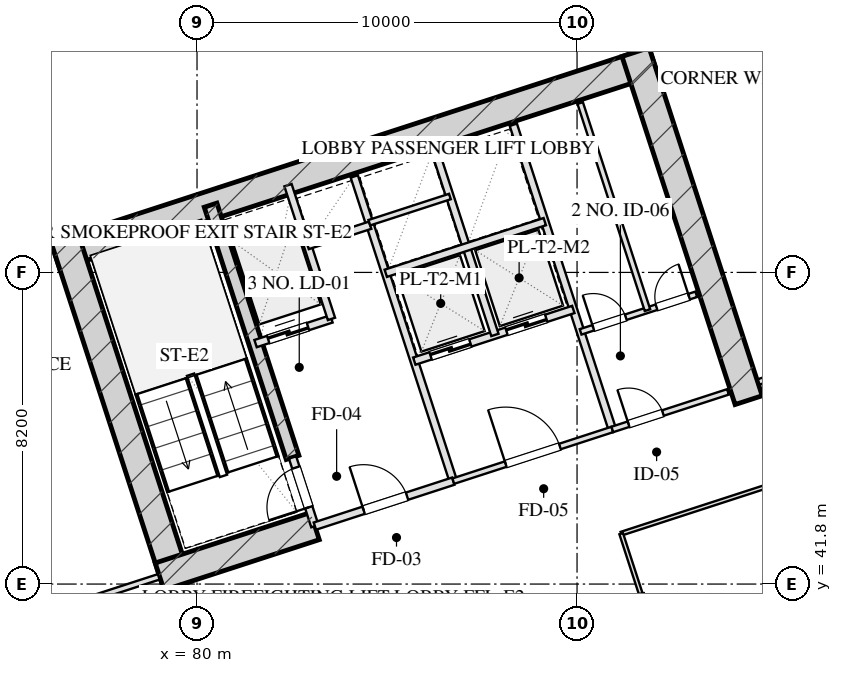
"""IFC4 building model, lengths in metres.
Left out: names, types, materials, properties, quantities, classifications, styles, units other than length and angle.
Written with IfcOpenShell. Run it as: python <this file> out.ifc"""

import sys

from ifc_helpers import new_model, si_unit, direction, frame, frame_2d, origin, place, context, subcontext, project, spatial, rectangle, extrude, element, fill, save


model = new_model("IFC4")
c1 = context("Model", 3, precision=1e-05, world=origin(), true_north=direction((0.0, 1.0)))
c2 = subcontext(c1, "Body", "Model", "MODEL_VIEW")
j1 = project(units=[si_unit("LENGTHUNIT", "METRE"), si_unit("PLANEANGLEUNIT", "RADIAN")], contexts=[c1])
p1 = place(None, origin())
s1 = spatial("IfcSite", under=j1, at=p1, CompositionType="ELEMENT")
p2 = place(p1, origin())
s2 = spatial("IfcBuilding", under=s1, at=p2, CompositionType="ELEMENT")
p3 = place(p2, frame((0.0, 0.0, 50.6)))
s3 = spatial("IfcBuildingStorey", under=s2, at=p3, CompositionType="ELEMENT", Elevation=50.6)
p4 = place(p3, frame((76.272, 50.443, 0.0), z_axis=(0.0, 0.0, 1.0), x_axis=(0.951056072937, 0.309018358888, 0.0)))
e1 = element("IfcWall", 1, at=p4, inside=s3, PredefinedType="SHEAR", context=c2, shape_type="SweptSolid", body=[
    extrude(rectangle(XDim=16.55, YDim=0.75, at=frame_2d((8.275, 0.0))), origin(), (0.0, 0.0, 1.0), 3.45),
])
for number, where, z_axis, x_axis in (
    (2, (79.489, 41.756, 0.0), (0.0, 0.0, 1.0), (-0.309, 0.951, 0.0)),
    (3, (94.515, 46.639, 0.0), (0.0, 0.0, 1.0), (-0.309, 0.951, 0.0)),
):
    element("IfcWall", number, at=place(p3, frame(where, z_axis=z_axis, x_axis=x_axis)), inside=s3, PredefinedType="SHEAR", context=c2, shape_type="SweptSolid", body=[
        extrude(rectangle(XDim=9.63, YDim=0.75, at=frame_2d((4.815, 0.0))), origin(), (0.0, 0.0, 1.0), 3.45),
    ])
p5 = place(p3, frame((82.514, 45.131, 0.0), z_axis=(0.0, 0.0, 1.0), x_axis=(-0.308988790936, 0.951065679686, 0.0)))
e4 = element("IfcWall", 4, at=p5, inside=s3, PredefinedType="SHEAR", context=c2, shape_type="SweptSolid", body=[
    extrude(rectangle(XDim=6.98, YDim=0.35, at=frame_2d((3.49, 0.0))), origin(), (0.0, 0.0, 1.0), 3.45),
])
p6 = place(p3, frame((79.016, 41.997, 0.0), z_axis=(0.0, 0.0, 1.0), x_axis=(0.95106038264, 0.309005094736, 0.0)))
e5 = element("IfcWall", 5, at=p6, inside=s3, PredefinedType="SHEAR", context=c2, shape_type="SweptSolid", body=[
    extrude(rectangle(XDim=4.295, YDim=0.75, at=frame_2d((2.147, 0.0))), origin(), (0.0, 0.0, 1.0), 3.45),
])
p7 = place(p3, frame((79.655, 4.352, 0.0), z_axis=(0.0, 0.0, 1.0), x_axis=(-0.309014526607, 0.951057318118, 0.0)))
e6 = element("IfcWall", 6, at=p7, inside=s3, PredefinedType="SOLIDWALL", context=c2, shape_type="SweptSolid", body=[
    extrude(rectangle(XDim=50.0, YDim=0.4, at=frame_2d((25.0, 0.0))), origin(), (0.0, 0.0, 1.0), 2.61),
])
p8 = place(p7, frame((27.05, 0.0, 0.0)))
e7 = element("IfcOpeningElement", 7, at=p8, cuts=e6, PredefinedType="OPENING", context=c2, shape_type="SweptSolid", body=[
    extrude(rectangle(XDim=1.1, YDim=2.15, at=frame_2d((0.55, 1.075))), frame((0.0, 0.21, 0.0), z_axis=(0.0, -1.0, 0.0), x_axis=(1.0, 0.0, 0.0)), (0.0, 0.0, 1.0), 0.42),
])
p9 = place(p3, frame((66.002, 55.433, 0.0), z_axis=(0.0, 0.0, 1.0), x_axis=(0.951055939317, 0.309018770125, 0.0)))
e8 = element("IfcWall", 8, at=p9, inside=s3, PredefinedType="SOLIDWALL", context=c2, shape_type="SweptSolid", body=[
    extrude(rectangle(XDim=32.4, YDim=0.4, at=frame_2d((16.2, 0.0))), origin(), (0.0, 0.0, 1.0), 2.61),
])
p10 = place(p3, frame((83.101, 43.324, 0.0), z_axis=(0.0, 0.0, 1.0), x_axis=(-0.309048298632, 0.951046344356, 0.0)))
e9 = element("IfcWall", 9, at=p10, inside=s3, PredefinedType="PARTITIONING", context=c2, shape_type="SweptSolid", body=[
    extrude(rectangle(XDim=1.9, YDim=0.2, at=frame_2d((0.95, 0.0))), origin(), (0.0, 0.0, 1.0), 3.175),
])
p11 = place(p10, frame((0.52, 0.0, 0.0)))
e10 = element("IfcOpeningElement", 10, at=p11, cuts=e9, PredefinedType="OPENING", context=c2, shape_type="SweptSolid", body=[
    extrude(rectangle(XDim=1.1, YDim=2.05, at=frame_2d((0.55, 1.025))), frame((0.0, 0.11, 0.0), z_axis=(0.0, -1.0, 0.0), x_axis=(1.0, 0.0, 0.0)), (0.0, 0.0, 1.0), 0.22),
])
p12 = place(p3, frame((86.743, 44.508, 0.0), z_axis=(0.0, 0.0, 1.0), x_axis=(-0.309016001439, 0.951056838919, 0.0)))
e11 = element("IfcWall", 11, at=p12, inside=s3, PredefinedType="PARTITIONING", context=c2, shape_type="SweptSolid", body=[
    extrude(rectangle(XDim=8.43, YDim=0.2, at=frame_2d((4.215, 0.0))), origin(), (0.0, 0.0, 1.0), 3.175),
])
p13 = place(p3, frame((83.101, 43.324, 0.0), z_axis=(0.0, 0.0, 1.0), x_axis=(0.951052804469, 0.309028417967, 0.0)))
e12 = element("IfcWall", 12, at=p13, inside=s3, PredefinedType="PARTITIONING", context=c2, shape_type="SweptSolid", body=[
    extrude(rectangle(XDim=3.83, YDim=0.2, at=frame_2d((1.915, 0.0))), origin(), (0.0, 0.0, 1.0), 3.175),
])
p14 = place(p13, frame((1.35, 0.0, 0.0)))
e13 = element("IfcOpeningElement", 13, at=p14, cuts=e12, PredefinedType="OPENING", context=c2, shape_type="SweptSolid", body=[
    extrude(rectangle(XDim=1.2, YDim=2.05, at=frame_2d((0.6, 1.025))), frame((0.0, 0.11, 0.0), z_axis=(0.0, -1.0, 0.0), x_axis=(1.0, 0.0, 0.0)), (0.0, 0.0, 1.0), 0.22),
])
p15 = place(p3, frame((81.54, 48.127, 0.0), z_axis=(0.0, 0.0, 1.0), x_axis=(0.951062257173, 0.308999325213, 0.0)))
e14 = element("IfcWall", 14, at=p15, inside=s3, PredefinedType="PARTITIONING", context=c2, shape_type="SweptSolid", body=[
    extrude(rectangle(XDim=2.1, YDim=0.2, at=frame_2d((1.05, 0.0))), origin(), (0.0, 0.0, 1.0), 3.175),
])
p16 = place(p15, frame((0.35, 0.0, 0.0)))
e15 = element("IfcOpeningElement", 15, at=p16, cuts=e14, PredefinedType="OPENING", context=c2, shape_type="SweptSolid", body=[
    extrude(rectangle(XDim=1.1, YDim=2.05, at=frame_2d((0.55, 1.025))), frame((0.0, 0.11, 0.0), z_axis=(0.0, -1.0, 0.0), x_axis=(1.0, 0.0, 0.0)), (0.0, 0.0, 1.0), 0.22),
])
p17 = place(p3, frame((83.538, 48.776, 0.0), z_axis=(0.0, 0.0, 1.0), x_axis=(-0.3089935693, 0.951064127245, 0.0)))
e16 = element("IfcWall", 16, at=p17, inside=s3, PredefinedType="PARTITIONING", context=c2, shape_type="SweptSolid", body=[
    extrude(rectangle(XDim=3.7, YDim=0.2, at=frame_2d((1.85, 0.0))), origin(), (0.0, 0.0, 1.0), 3.175),
])
p18 = place(p3, frame((82.91, 50.707, 0.0), z_axis=(0.0, 0.0, 1.0), x_axis=(0.951041328149, 0.309063734775, 0.0)))
e17 = element("IfcWall", 17, at=p18, inside=s3, PredefinedType="PARTITIONING", context=c2, shape_type="SweptSolid", body=[
    extrude(rectangle(XDim=1.73, YDim=0.2, at=frame_2d((0.865, 0.0))), origin(), (0.0, 0.0, 1.0), 3.175),
])
p19 = place(p3, frame((90.928, 45.868, 0.0), z_axis=(0.0, 0.0, 1.0), x_axis=(-0.309042196757, 0.951048327176, 0.0)))
e18 = element("IfcWall", 18, at=p19, inside=s3, PredefinedType="PARTITIONING", context=c2, shape_type="SweptSolid", body=[
    extrude(rectangle(XDim=8.43, YDim=0.2, at=frame_2d((4.215, 0.0))), origin(), (0.0, 0.0, 1.0), 3.175),
])
p20 = place(p3, frame((86.743, 44.508, 0.0), z_axis=(0.0, 0.0, 1.0), x_axis=(0.951063829732, 0.308994485023, 0.0)))
e19 = element("IfcWall", 19, at=p20, inside=s3, PredefinedType="PARTITIONING", context=c2, shape_type="SweptSolid", body=[
    extrude(rectangle(XDim=4.4, YDim=0.15, at=frame_2d((2.2, 0.0))), origin(), (0.0, 0.0, 1.0), 3.175),
])
p21 = place(p20, frame((1.45, 0.0, 0.0)))
e20 = element("IfcOpeningElement", 20, at=p21, cuts=e19, PredefinedType="OPENING", context=c2, shape_type="SweptSolid", body=[
    extrude(rectangle(XDim=1.5, YDim=2.05, at=frame_2d((0.75, 1.025))), frame((0.0, 0.085, 0.0), z_axis=(0.0, -1.0, 0.0), x_axis=(1.0, 0.0, 0.0)), (0.0, 0.0, 1.0), 0.17),
])
p22 = place(p3, frame((85.718, 47.666, 0.0), z_axis=(0.0, 0.0, 1.0), x_axis=(0.951058531764, 0.30901079133, 0.0)))
e21 = element("IfcWall", 21, at=p22, inside=s3, PredefinedType="PARTITIONING", context=c2, shape_type="SweptSolid", body=[
    extrude(rectangle(XDim=4.4, YDim=0.2, at=frame_2d((2.2, 0.0))), origin(), (0.0, 0.0, 1.0), 3.175),
])
p23 = place(p22, frame((0.45, 0.0, 0.0)))
e22 = element("IfcOpeningElement", 22, at=p23, cuts=e21, PredefinedType="OPENING", context=c2, shape_type="SweptSolid", body=[
    extrude(rectangle(XDim=1.1, YDim=2.05, at=frame_2d((0.55, 1.025))), frame((0.0, 0.11, 0.0), z_axis=(0.0, -1.0, 0.0), x_axis=(1.0, 0.0, 0.0)), (0.0, 0.0, 1.0), 0.22),
])
p24 = place(p22, frame((2.55, 0.0, 0.0)))
e23 = element("IfcOpeningElement", 23, at=p24, cuts=e21, PredefinedType="OPENING", context=c2, shape_type="SweptSolid", body=[
    extrude(rectangle(XDim=1.1, YDim=2.05, at=frame_2d((0.55, 1.025))), frame((0.0, 0.11, 0.0), z_axis=(0.0, -1.0, 0.0), x_axis=(1.0, 0.0, 0.0)), (0.0, 0.0, 1.0), 0.22),
])
p25 = place(p3, frame((87.838, 48.354, 0.0), z_axis=(0.0, 0.0, 1.0), x_axis=(-0.3090093719, 0.951058992953, 0.0)))
e24 = element("IfcWall", 24, at=p25, inside=s3, PredefinedType="PARTITIONING", context=c2, shape_type="SweptSolid", body=[
    extrude(rectangle(XDim=5.11, YDim=0.2, at=frame_2d((2.555, 0.0))), origin(), (0.0, 0.0, 1.0), 3.175),
])
p26 = place(p3, frame((84.967, 49.977, 0.0), z_axis=(0.0, 0.0, 1.0), x_axis=(0.951063829732, 0.308994485023, 0.0)))
e25 = element("IfcWall", 25, at=p26, inside=s3, PredefinedType="PARTITIONING", context=c2, shape_type="SweptSolid", body=[
    extrude(rectangle(XDim=4.4, YDim=0.2, at=frame_2d((2.2, 0.0))), origin(), (0.0, 0.0, 1.0), 3.175),
])
p27 = place(p3, frame((84.534, 51.308, 0.0), z_axis=(0.0, 0.0, 1.0), x_axis=(0.951075093106, 0.308959814982, 0.0)))
e26 = element("IfcWall", 26, at=p27, inside=s3, PredefinedType="PARTITIONING", context=c2, shape_type="SweptSolid", body=[
    extrude(rectangle(XDim=2.23, YDim=0.15, at=frame_2d((1.115, 0.0))), origin(), (0.0, 0.0, 1.0), 3.175),
])
p28 = place(p3, frame((90.928, 45.868, 0.0), z_axis=(0.0, 0.0, 1.0), x_axis=(0.951059297078, 0.309008435874, 0.0)))
e27 = element("IfcWall", 27, at=p28, inside=s3, PredefinedType="PARTITIONING", context=c2, shape_type="SweptSolid", body=[
    extrude(rectangle(XDim=3.2, YDim=0.15, at=frame_2d((1.6, 0.0))), origin(), (0.0, 0.0, 1.0), 3.175),
])
p29 = place(p28, frame((0.45, 0.0, 0.0)))
e28 = element("IfcOpeningElement", 28, at=p29, cuts=e27, PredefinedType="OPENING", context=c2, shape_type="SweptSolid", body=[
    extrude(rectangle(XDim=0.95, YDim=2.05, at=frame_2d((0.475, 1.025))), frame((0.0, 0.085, 0.0), z_axis=(0.0, -1.0, 0.0), x_axis=(1.0, 0.0, 0.0)), (0.0, 0.0, 1.0), 0.17),
])
p30 = place(p3, frame((90.094, 48.436, 0.0), z_axis=(0.0, 0.0, 1.0), x_axis=(0.951066581729, 0.308986014439, 0.0)))
e29 = element("IfcWall", 29, at=p30, inside=s3, PredefinedType="PARTITIONING", context=c2, shape_type="SweptSolid", body=[
    extrude(rectangle(XDim=3.2, YDim=0.15, at=frame_2d((1.6, 0.0))), origin(), (0.0, 0.0, 1.0), 3.175),
])
p31 = place(p30, frame((0.35, 0.0, 0.0)))
e30 = element("IfcOpeningElement", 30, at=p31, cuts=e29, PredefinedType="OPENING", context=c2, shape_type="SweptSolid", body=[
    extrude(rectangle(XDim=0.9, YDim=2.05, at=frame_2d((0.45, 1.025))), frame((0.0, 0.085, 0.0), z_axis=(0.0, -1.0, 0.0), x_axis=(1.0, 0.0, 0.0)), (0.0, 0.0, 1.0), 0.17),
])
p32 = place(p30, frame((2.1, 0.0, 0.0)))
e31 = element("IfcOpeningElement", 31, at=p32, cuts=e29, PredefinedType="OPENING", context=c2, shape_type="SweptSolid", body=[
    extrude(rectangle(XDim=0.9, YDim=2.05, at=frame_2d((0.45, 1.025))), frame((0.0, 0.085, 0.0), z_axis=(0.0, -1.0, 0.0), x_axis=(1.0, 0.0, 0.0)), (0.0, 0.0, 1.0), 0.17),
])
p33 = place(p3, frame((91.853, 49.007, 0.0), z_axis=(0.0, 0.0, 1.0), x_axis=(-0.309022487551, 0.951054731437, 0.0)))
e32 = element("IfcWall", 32, at=p33, inside=s3, PredefinedType="PARTITIONING", context=c2, shape_type="SweptSolid", body=[
    extrude(rectangle(XDim=5.73, YDim=0.15, at=frame_2d((2.865, 0.0))), origin(), (0.0, 0.0, 1.0), 3.175),
])
p34 = place(p3, frame((68.721, 38.652, 0.0), z_axis=(0.0, 0.0, 1.0), x_axis=(0.951056658866, 0.309016555588, 0.0)))
e33 = element("IfcWall", 33, at=p34, inside=s3, PredefinedType="PARTITIONING", context=c2, shape_type="SweptSolid", body=[
    extrude(rectangle(XDim=10.8, YDim=0.15, at=frame_2d((5.4, 0.0))), origin(), (0.0, 0.0, 1.0), 3.175),
])
p35 = place(p34, frame((4.536, 0.0, 0.0)))
e34 = element("IfcOpeningElement", 34, at=p35, cuts=e33, PredefinedType="OPENING", context=c2, shape_type="SweptSolid", body=[
    extrude(rectangle(XDim=1.05, YDim=2.05, at=frame_2d((0.525, 1.025))), frame((0.0, 0.085, 0.0), z_axis=(0.0, -1.0, 0.0), x_axis=(1.0, 0.0, 0.0)), (0.0, 0.0, 1.0), 0.17),
])
p36 = place(p3, frame((94.78, 47.119, 0.0), z_axis=(0.0, 0.0, 1.0), x_axis=(0.951054294345, 0.309023832749, 0.0)))
e35 = element("IfcWall", 35, at=p36, inside=s3, PredefinedType="PARTITIONING", context=c2, shape_type="SweptSolid", body=[
    extrude(rectangle(XDim=10.2, YDim=0.15, at=frame_2d((5.1, 0.0))), origin(), (0.0, 0.0, 1.0), 3.175),
])
p37 = place(p36, frame((4.284, 0.0, 0.0)))
e36 = element("IfcOpeningElement", 36, at=p37, cuts=e35, PredefinedType="OPENING", context=c2, shape_type="SweptSolid", body=[
    extrude(rectangle(XDim=1.0, YDim=2.05, at=frame_2d((0.5, 1.025))), frame((0.0, 0.085, 0.0), z_axis=(0.0, -1.0, 0.0), x_axis=(1.0, 0.0, 0.0)), (0.0, 0.0, 1.0), 0.17),
])
p38 = place(p3, frame((69.549, 36.103, 0.0), z_axis=(0.0, 0.0, 1.0), x_axis=(0.951057491432, 0.309013993197, 0.0)))
e37 = element("IfcWall", 37, at=p38, inside=s3, PredefinedType="MOVABLE", context=c2, shape_type="SweptSolid", body=[
    extrude(rectangle(XDim=18.075, YDim=0.1, at=frame_2d((9.038, 0.0))), origin(), (0.0, 0.0, 1.0), 3.175),
])
p39 = place(p3, frame((91.162, 43.126, 0.0), z_axis=(0.0, 0.0, 1.0), x_axis=(0.951055535739, 0.309020012199, 0.0)))
e38 = element("IfcWall", 38, at=p39, inside=s3, PredefinedType="MOVABLE", context=c2, shape_type="SweptSolid", body=[
    extrude(rectangle(XDim=14.875, YDim=0.1, at=frame_2d((7.438, 0.0))), origin(), (0.0, 0.0, 1.0), 3.175),
])
p40 = place(p3, frame((91.882, 25.863, 0.0), z_axis=(0.0, 0.0, 1.0), x_axis=(-0.309022042254, 0.951054876125, 0.0)))
e39 = element("IfcWall", 39, at=p40, inside=s3, PredefinedType="MOVABLE", context=c2, shape_type="SweptSolid", body=[
    extrude(rectangle(XDim=16.64, YDim=0.1, at=frame_2d((8.32, 0.0))), origin(), (0.0, 0.0, 1.0), 3.175),
])
p41 = place(p40, frame((1.16, 0.0, 0.0)))
e40 = element("IfcOpeningElement", 40, at=p41, cuts=e39, PredefinedType="OPENING", context=c2, shape_type="SweptSolid", body=[
    extrude(rectangle(XDim=1.0, YDim=2.05, at=frame_2d((0.5, 1.025))), frame((0.0, 0.06, 0.0), z_axis=(0.0, -1.0, 0.0), x_axis=(1.0, 0.0, 0.0)), (0.0, 0.0, 1.0), 0.12),
])
p42 = place(p40, frame((6.16, 0.0, 0.0)))
e41 = element("IfcOpeningElement", 41, at=p42, cuts=e39, PredefinedType="OPENING", context=c2, shape_type="SweptSolid", body=[
    extrude(rectangle(XDim=1.0, YDim=2.05, at=frame_2d((0.5, 1.025))), frame((0.0, 0.06, 0.0), z_axis=(0.0, -1.0, 0.0), x_axis=(1.0, 0.0, 0.0)), (0.0, 0.0, 1.0), 0.12),
])
p43 = place(p40, frame((10.16, 0.0, 0.0)))
e42 = element("IfcOpeningElement", 42, at=p43, cuts=e39, PredefinedType="OPENING", context=c2, shape_type="SweptSolid", body=[
    extrude(rectangle(XDim=1.0, YDim=2.05, at=frame_2d((0.5, 1.025))), frame((0.0, 0.06, 0.0), z_axis=(0.0, -1.0, 0.0), x_axis=(1.0, 0.0, 0.0)), (0.0, 0.0, 1.0), 0.12),
])
p44 = place(p40, frame((14.48, 0.0, 0.0)))
e43 = element("IfcOpeningElement", 43, at=p44, cuts=e39, PredefinedType="OPENING", context=c2, shape_type="SweptSolid", body=[
    extrude(rectangle(XDim=1.0, YDim=2.05, at=frame_2d((0.5, 1.025))), frame((0.0, 0.06, 0.0), z_axis=(0.0, -1.0, 0.0), x_axis=(1.0, 0.0, 0.0)), (0.0, 0.0, 1.0), 0.12),
])
p45 = place(p3, frame((96.304, 27.3, 0.0), z_axis=(0.0, 0.0, 1.0), x_axis=(-0.30901773025, 0.951056277195, 0.0)))
e44 = element("IfcWall", 44, at=p45, inside=s3, PredefinedType="MOVABLE", context=c2, shape_type="SweptSolid", body=[
    extrude(rectangle(XDim=16.64, YDim=0.1, at=frame_2d((8.32, 0.0))), origin(), (0.0, 0.0, 1.0), 3.175),
])
p46 = place(p45, frame((1.66, 0.0, 0.0)))
e45 = element("IfcOpeningElement", 45, at=p46, cuts=e44, PredefinedType="OPENING", context=c2, shape_type="SweptSolid", body=[
    extrude(rectangle(XDim=1.0, YDim=2.05, at=frame_2d((0.5, 1.025))), frame((0.0, 0.06, 0.0), z_axis=(0.0, -1.0, 0.0), x_axis=(1.0, 0.0, 0.0)), (0.0, 0.0, 1.0), 0.12),
])
p47 = place(p45, frame((7.82, 0.0, 0.0)))
e46 = element("IfcOpeningElement", 46, at=p47, cuts=e44, PredefinedType="OPENING", context=c2, shape_type="SweptSolid", body=[
    extrude(rectangle(XDim=1.05, YDim=2.05, at=frame_2d((0.525, 1.025))), frame((0.0, 0.06, 0.0), z_axis=(0.0, -1.0, 0.0), x_axis=(1.0, 0.0, 0.0)), (0.0, 0.0, 1.0), 0.12),
])
p48 = place(p45, frame((13.98, 0.0, 0.0)))
e47 = element("IfcOpeningElement", 47, at=p48, cuts=e44, PredefinedType="OPENING", context=c2, shape_type="SweptSolid", body=[
    extrude(rectangle(XDim=1.0, YDim=2.05, at=frame_2d((0.5, 1.025))), frame((0.0, 0.06, 0.0), z_axis=(0.0, -1.0, 0.0), x_axis=(1.0, 0.0, 0.0)), (0.0, 0.0, 1.0), 0.12),
])
p49 = place(p3, frame((92.497, 39.017, 0.0), z_axis=(0.0, 0.0, 1.0), x_axis=(0.951055535739, 0.309020012199, 0.0)))
e48 = element("IfcWall", 48, at=p49, inside=s3, PredefinedType="MOVABLE", context=c2, shape_type="SweptSolid", body=[
    extrude(rectangle(XDim=14.875, YDim=0.1, at=frame_2d((7.438, 0.0))), origin(), (0.0, 0.0, 1.0), 3.175),
])
p50 = place(p11, origin())
e49 = element("IfcDoor", 49, at=p50, inside=s3, OperationType="SINGLE_SWING_LEFT", PredefinedType="DOOR", context=c2, shape_type="SweptSolid", body=[
    extrude(rectangle(XDim=1.1, YDim=2.05, at=frame_2d((0.55, 1.025))), frame((0.0, 0.025, 0.0), z_axis=(0.0, -1.0, 0.0), x_axis=(1.0, 0.0, 0.0)), (0.0, 0.0, 1.0), 0.05),
])
fill(e10, e49)
p51 = place(p14, origin())
e50 = element("IfcDoor", 50, at=p51, inside=s3, OperationType="SINGLE_SWING_LEFT", PredefinedType="DOOR", context=c2, shape_type="SweptSolid", body=[
    extrude(rectangle(XDim=1.2, YDim=2.05, at=frame_2d((0.6, 1.025))), frame((0.0, 0.025, 0.0), z_axis=(0.0, -1.0, 0.0), x_axis=(1.0, 0.0, 0.0)), (0.0, 0.0, 1.0), 0.05),
])
fill(e13, e50)
p52 = place(p16, origin())
e51 = element("IfcDoor", 51, at=p52, inside=s3, OperationType="DOUBLE_DOOR_SLIDING", PredefinedType="DOOR", context=c2, shape_type="SweptSolid", body=[
    extrude(rectangle(XDim=1.1, YDim=2.05, at=frame_2d((0.55, 1.025))), frame((0.0, 0.025, 0.0), z_axis=(0.0, -1.0, 0.0), x_axis=(1.0, 0.0, 0.0)), (0.0, 0.0, 1.0), 0.05),
])
fill(e15, e51)
p53 = place(p21, origin())
e52 = element("IfcDoor", 52, at=p53, inside=s3, OperationType="SINGLE_SWING_LEFT", PredefinedType="DOOR", context=c2, shape_type="SweptSolid", body=[
    extrude(rectangle(XDim=1.5, YDim=2.05, at=frame_2d((0.75, 1.025))), frame((0.0, 0.025, 0.0), z_axis=(0.0, -1.0, 0.0), x_axis=(1.0, 0.0, 0.0)), (0.0, 0.0, 1.0), 0.05),
])
fill(e20, e52)
p54 = place(p23, origin())
e53 = element("IfcDoor", 53, at=p54, inside=s3, OperationType="DOUBLE_DOOR_SLIDING", PredefinedType="DOOR", context=c2, shape_type="SweptSolid", body=[
    extrude(rectangle(XDim=1.1, YDim=2.05, at=frame_2d((0.55, 1.025))), frame((0.0, 0.025, 0.0), z_axis=(0.0, -1.0, 0.0), x_axis=(1.0, 0.0, 0.0)), (0.0, 0.0, 1.0), 0.05),
])
fill(e22, e53)
p55 = place(p24, origin())
e54 = element("IfcDoor", 54, at=p55, inside=s3, OperationType="DOUBLE_DOOR_SLIDING", PredefinedType="DOOR", context=c2, shape_type="SweptSolid", body=[
    extrude(rectangle(XDim=1.1, YDim=2.05, at=frame_2d((0.55, 1.025))), frame((0.0, 0.025, 0.0), z_axis=(0.0, -1.0, 0.0), x_axis=(1.0, 0.0, 0.0)), (0.0, 0.0, 1.0), 0.05),
])
fill(e23, e54)
p56 = place(p29, origin())
e55 = element("IfcDoor", 55, at=p56, inside=s3, OperationType="SINGLE_SWING_LEFT", PredefinedType="DOOR", context=c2, shape_type="SweptSolid", body=[
    extrude(rectangle(XDim=0.95, YDim=2.05, at=frame_2d((0.475, 1.025))), frame((0.0, 0.025, 0.0), z_axis=(0.0, -1.0, 0.0), x_axis=(1.0, 0.0, 0.0)), (0.0, 0.0, 1.0), 0.05),
])
fill(e28, e55)
p57 = place(p31, origin())
e56 = element("IfcDoor", 56, at=p57, inside=s3, OperationType="SINGLE_SWING_LEFT", PredefinedType="DOOR", context=c2, shape_type="SweptSolid", body=[
    extrude(rectangle(XDim=0.9, YDim=2.05, at=frame_2d((0.45, 1.025))), frame((0.0, 0.025, 0.0), z_axis=(0.0, -1.0, 0.0), x_axis=(1.0, 0.0, 0.0)), (0.0, 0.0, 1.0), 0.05),
])
fill(e30, e56)
p58 = place(p32, origin())
e57 = element("IfcDoor", 57, at=p58, inside=s3, OperationType="SINGLE_SWING_RIGHT", PredefinedType="DOOR", context=c2, shape_type="SweptSolid", body=[
    extrude(rectangle(XDim=0.9, YDim=2.05, at=frame_2d((0.45, 1.025))), frame((0.0, 0.025, 0.0), z_axis=(0.0, -1.0, 0.0), x_axis=(1.0, 0.0, 0.0)), (0.0, 0.0, 1.0), 0.05),
])
fill(e31, e57)
p59 = place(p48, origin())
e58 = element("IfcDoor", 58, at=p59, inside=s3, OperationType="SINGLE_SWING_RIGHT", PredefinedType="DOOR", context=c2, shape_type="SweptSolid", body=[
    extrude(rectangle(XDim=1.0, YDim=2.05, at=frame_2d((0.5, 1.025))), frame((0.0, 0.025, 0.0), z_axis=(0.0, -1.0, 0.0), x_axis=(1.0, 0.0, 0.0)), (0.0, 0.0, 1.0), 0.05),
])
fill(e47, e58)
save(model, sys.argv[1])
